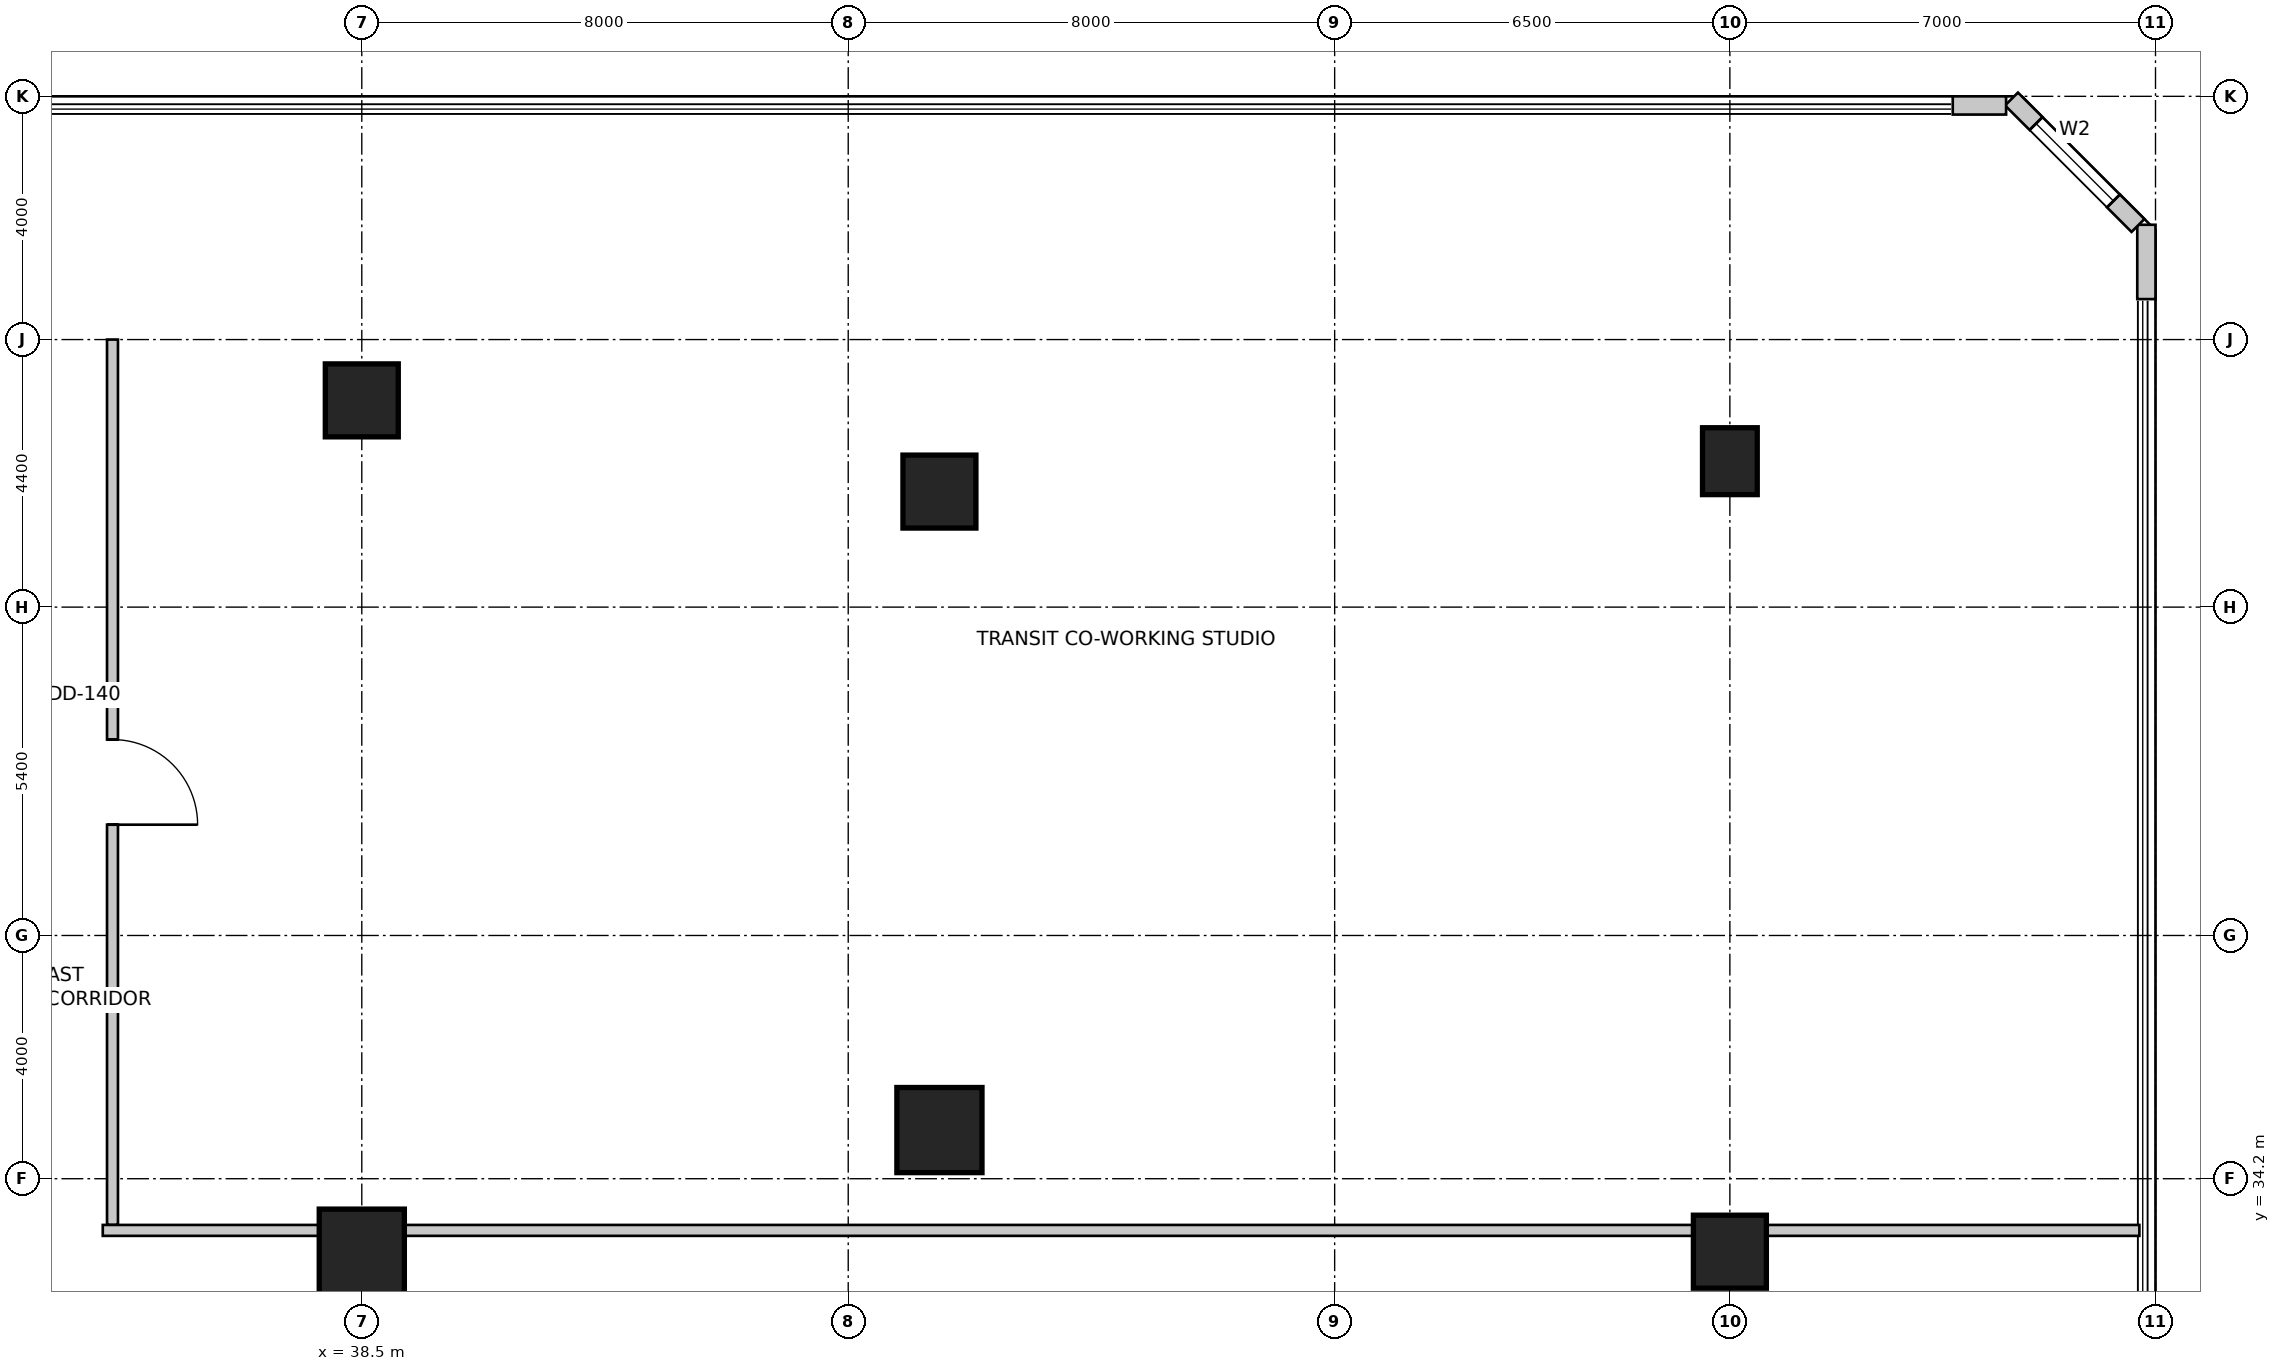
"""IFC4 building model, lengths in metres.
Left out: names, types, materials, properties, quantities, classifications, styles, units other than length and angle.
Written with IfcOpenShell. Run it as: python <this file> out.ifc"""

import sys

from ifc_helpers import new_model, si_unit, direction, frame, frame_2d, origin, origin_2d, place, context, subcontext, project, spatial, rectangle, extrude, source, transform, mapped, element, fill, save


model = new_model("IFC4")
c1 = context("Model", 3, precision=1e-05, world=origin(), true_north=direction((0.0, 1.0)))
c2 = subcontext(c1, "Body", "Model", "MODEL_VIEW")
j1 = project(units=[si_unit("LENGTHUNIT", "METRE"), si_unit("PLANEANGLEUNIT", "RADIAN")], contexts=[c1])
p1 = place(None, origin())
s1 = spatial("IfcSite", under=j1, at=p1, CompositionType="ELEMENT")
p2 = place(p1, origin())
s2 = spatial("IfcBuilding", under=s1, at=p2, CompositionType="ELEMENT")
p3 = place(p2, frame((0.0, 0.0, 6.0)))
s3 = spatial("IfcBuildingStorey", under=s2, at=p3, CompositionType="ELEMENT", Elevation=6.0)
m1 = source(origin(), c2, "Body", "SweptSolid", [
    extrude(rectangle(XDim=1.4, YDim=1.4, at=origin_2d()), origin(), (0.0, 0.0, 1.0), 5.2),
])
for number, where, z_axis, x_axis in (
    (1, (38.5, 33.0, 0.0), (0.0, 0.0, 1.0), (1.0, 0.0, 0.0)),
    (2, (48.0, 35.0, 0.0), (0.0, 0.0, 1.0), (1.0, 0.0, 0.0)),
):
    element("IfcColumn", number, at=place(p3, frame(where, z_axis=z_axis, x_axis=x_axis)), inside=s3, PredefinedType="COLUMN", context=c2, shape_type="MappedRepresentation", body=[
        mapped(m1, transform((0.0, 0.0, 0.0), scale=1.0)),
    ])
m2 = source(origin(), c2, "Body", "SweptSolid", [
    extrude(rectangle(XDim=1.2, YDim=1.2, at=origin_2d()), origin(), (0.0, 0.0, 1.0), 5.2),
])
for number, where, z_axis, x_axis in (
    (3, (61.0, 33.0, 0.0), (0.0, 0.0, 1.0), (1.0, 0.0, 0.0)),
    (4, (38.5, 47.0, 0.0), (0.0, 0.0, 1.0), (1.0, 0.0, 0.0)),
    (5, (48.0, 45.5, 0.0), (0.0, 0.0, 1.0), (1.0, 0.0, 0.0)),
):
    element("IfcColumn", number, at=place(p3, frame(where, z_axis=z_axis, x_axis=x_axis)), inside=s3, PredefinedType="COLUMN", context=c2, shape_type="MappedRepresentation", body=[
        mapped(m2, transform((0.0, 0.0, 0.0), scale=1.0)),
    ])
m3 = source(origin(), c2, "Body", "SweptSolid", [
    extrude(rectangle(XDim=0.9, YDim=1.1, at=origin_2d()), origin(), (0.0, 0.0, 1.0), 5.2),
])
p4 = place(p3, frame((61.0, 46.0, 0.0), z_axis=(0.0, 0.0, 1.0), x_axis=(1.0, 0.0, 0.0)))
e6 = element("IfcColumn", 6, at=p4, inside=s3, PredefinedType="COLUMN", context=c2, shape_type="MappedRepresentation", body=[
    mapped(m3, transform((0.0, 0.0, 0.0), scale=1.0)),
])
p5 = place(p3, frame((67.85, 48.665, 0.0), z_axis=(0.0, 0.0, 1.0), x_axis=(0.0, 1.0, 0.0)))
e7 = element("IfcWall", 7, at=p5, inside=s3, PredefinedType="SOLIDWALL", context=c2, shape_type="SweptSolid", body=[
    extrude(rectangle(XDim=1.223, YDim=0.3, at=frame_2d((0.611, 0.0))), origin(), (0.0, 0.0, 1.0), 4.9),
])
p6 = place(p3, frame((67.712, 49.876, 0.0), z_axis=(0.0, 0.0, 1.0), x_axis=(-0.707106781187, 0.707106781187, 0.0)))
e8 = element("IfcWall", 8, at=p6, inside=s3, PredefinedType="SOLIDWALL", context=c2, shape_type="SweptSolid", body=[
    extrude(rectangle(XDim=2.942, YDim=0.3, at=frame_2d((1.471, 0.0))), origin(), (0.0, 0.0, 1.0), 4.9),
])
m4 = source(origin(), c2, "Body", "SweptSolid", [
    extrude(rectangle(XDim=1.8, YDim=2.1, at=frame_2d((0.9, 1.05))), frame((0.0, 0.16, 0.0), z_axis=(0.0, -1.0, 0.0), x_axis=(1.0, 0.0, 0.0)), (0.0, 0.0, 1.0), 0.32),
])
p7 = place(p6, frame((0.571, 0.0, 0.85)))
e9 = element("IfcOpeningElement", 9, at=p7, cuts=e8, PredefinedType="OPENING", context=c2, shape_type="MappedRepresentation", body=[
    mapped(m4, transform((0.0, 0.0, 0.0), scale=1.0)),
])
p8 = place(p3, frame((65.543, 51.85, 0.0), z_axis=(0.0, 0.0, 1.0), x_axis=(-1.0, 0.0, 0.0)))
e10 = element("IfcWall", 10, at=p8, inside=s3, PredefinedType="SOLIDWALL", context=c2, shape_type="SweptSolid", body=[
    extrude(rectangle(XDim=0.877, YDim=0.3, at=frame_2d((0.439, 0.0))), origin(), (0.0, 0.0, 1.0), 4.9),
])
p9 = place(p3, frame((34.24, 33.35, 0.0), z_axis=(0.0, 0.0, 1.0), x_axis=(1.0, 0.0, 0.0)))
e11 = element("IfcWall", 11, at=p9, inside=s3, PredefinedType="PARTITIONING", context=c2, shape_type="SweptSolid", body=[
    extrude(rectangle(XDim=33.495, YDim=0.18, at=frame_2d((16.748, 0.0))), origin(), (0.0, 0.0, 1.0), 3.092),
])
p10 = place(p3, frame((34.4, 48.0, 0.0), z_axis=(0.0, 0.0, 1.0), x_axis=(0.0, -1.0, 0.0)))
e12 = element("IfcWall", 12, at=p10, inside=s3, PredefinedType="PARTITIONING", context=c2, shape_type="SweptSolid", body=[
    extrude(rectangle(XDim=14.556, YDim=0.18, at=frame_2d((7.278, 0.0))), origin(), (0.0, 0.0, 1.0), 3.942),
])
m5 = source(origin(), c2, "Body", "SweptSolid", [
    extrude(rectangle(XDim=1.4, YDim=2.15, at=frame_2d((0.7, 1.075))), frame((0.0, 0.1, 0.0), z_axis=(0.0, -1.0, 0.0), x_axis=(1.0, 0.0, 0.0)), (0.0, 0.0, 1.0), 0.2),
])
p11 = place(p10, frame((6.578, 0.0, 0.0)))
e13 = element("IfcOpeningElement", 13, at=p11, cuts=e12, PredefinedType="OPENING", context=c2, shape_type="MappedRepresentation", body=[
    mapped(m5, transform((0.0, 0.0, 0.0), scale=1.0)),
])
m6 = source(origin(), c2, "Body", "SweptSolid", [
    extrude(rectangle(XDim=1.8, YDim=2.1, at=frame_2d((0.9, 1.05))), frame((0.0, -0.015, 0.0), z_axis=(0.0, -1.0, 0.0), x_axis=(1.0, 0.0, 0.0)), (0.0, 0.0, 1.0), 0.06),
])
p12 = place(p7, origin())
e14 = element("IfcWindow", 14, at=p12, inside=s3, PartitioningType="SINGLE_PANEL", PredefinedType="WINDOW", context=c2, shape_type="MappedRepresentation", body=[
    mapped(m6, transform((0.0, 0.0, 0.0), scale=1.0)),
])
fill(e9, e14)
m7 = source(origin(), c2, "Body", "SweptSolid", [
    extrude(rectangle(XDim=1.4, YDim=2.15, at=frame_2d((0.7, 1.075))), frame((0.0, 0.025, 0.0), z_axis=(0.0, -1.0, 0.0), x_axis=(1.0, 0.0, 0.0)), (0.0, 0.0, 1.0), 0.05),
])
p13 = place(p11, origin())
e15 = element("IfcDoor", 15, at=p13, inside=s3, OperationType="SINGLE_SWING_RIGHT", PredefinedType="DOOR", context=c2, shape_type="MappedRepresentation", body=[
    mapped(m7, transform((0.0, 0.0, 0.0), scale=1.0)),
])
fill(e13, e15)
save(model, sys.argv[1])
